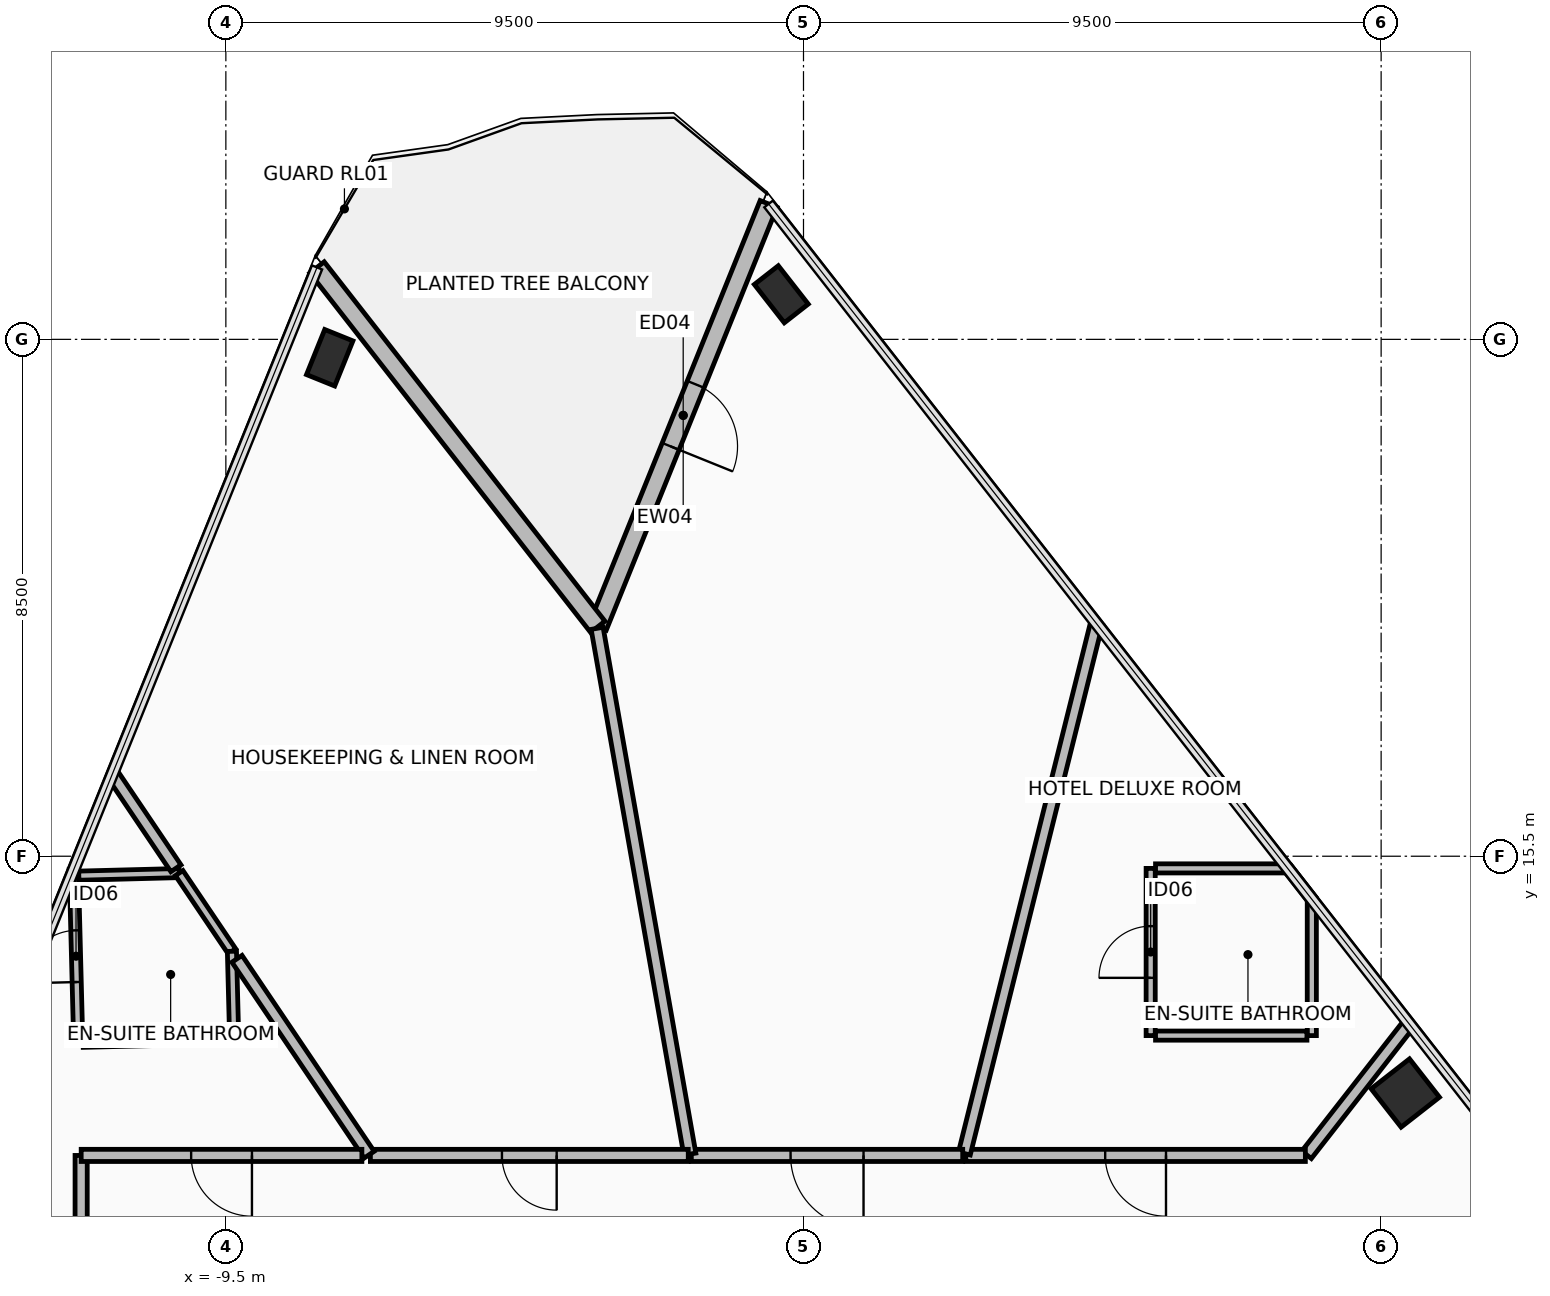
"""IFC4 building model, lengths in metres.
Left out: names, types, materials, properties, quantities, classifications, styles, units other than length and angle.
Written with IfcOpenShell. Run it as: python <this file> out.ifc"""

import sys

from ifc_helpers import new_model, si_unit, direction, frame, frame_2d, origin, origin_2d, place, context, subcontext, project, spatial, rectangle, hollow_rectangle, extrude, element, fill, save


model = new_model("IFC4")
c1 = context("Model", 3, precision=1e-05, world=origin(), true_north=direction((0.0, 1.0)))
c2 = subcontext(c1, "Body", "Model", "MODEL_VIEW")
j1 = project(units=[si_unit("LENGTHUNIT", "METRE"), si_unit("PLANEANGLEUNIT", "RADIAN")], contexts=[c1])
p1 = place(None, origin())
s1 = spatial("IfcSite", under=j1, at=p1, CompositionType="ELEMENT")
p2 = place(p1, origin())
s2 = spatial("IfcBuilding", under=s1, at=p2, CompositionType="ELEMENT")
p3 = place(p2, frame((0.0, 0.0, 70.75)))
s3 = spatial("IfcBuildingStorey", under=s2, at=p3, CompositionType="ELEMENT", Elevation=70.75)
p4 = place(p3, frame((-7.792, 23.698, 0.0), z_axis=(0.0, 0.0, 1.0), x_axis=(0.374608211656, 0.927183200754, 0.0)))
e1 = element("IfcColumn", 1, at=p4, inside=s3, PredefinedType="COLUMN", context=c2, shape_type="SweptSolid", body=[
    extrude(hollow_rectangle(XDim=0.5, YDim=0.8, WallThickness=0.04, at=origin_2d()), origin(), (0.0, 0.0, 1.0), 3.45),
])
p5 = place(p3, frame((9.898, 11.606, 0.0), z_axis=(0.0, 0.0, 1.0), x_axis=(-0.615661475326, 0.788010753607, 0.0)))
e2 = element("IfcColumn", 2, at=p5, inside=s3, PredefinedType="COLUMN", context=c2, shape_type="SweptSolid", body=[
    extrude(hollow_rectangle(XDim=0.8, YDim=0.8, WallThickness=0.045, at=origin_2d()), origin(), (0.0, 0.0, 1.0), 3.45),
])
p6 = place(p3, frame((-0.365, 24.741, 0.0), z_axis=(0.0, 0.0, 1.0), x_axis=(-0.615661475326, 0.788010753607, 0.0)))
e3 = element("IfcColumn", 3, at=p6, inside=s3, PredefinedType="COLUMN", context=c2, shape_type="SweptSolid", body=[
    extrude(hollow_rectangle(XDim=0.5, YDim=0.8, WallThickness=0.04, at=origin_2d()), origin(), (0.0, 0.0, 1.0), 3.45),
])
p7 = place(p3, frame((-0.574, 26.227, 0.0), z_axis=(0.0, 0.0, 1.0), x_axis=(-0.374609979755, -0.92718248639, 0.0)))
e4 = element("IfcWall", 4, at=p7, inside=s3, PredefinedType="STANDARD", context=c2, shape_type="SweptSolid", body=[
    extrude(rectangle(XDim=7.5, YDim=0.3, at=frame_2d((3.75, 0.0))), origin(), (0.0, 0.0, 1.0), 2.47),
])
p8 = place(p7, frame((3.2, 0.0, 0.0)))
e5 = element("IfcOpeningElement", 5, at=p8, cuts=e4, PredefinedType="OPENING", context=c2, shape_type="SweptSolid", body=[
    extrude(rectangle(XDim=1.1, YDim=2.2, at=frame_2d((0.55, 1.1))), frame((0.0, 0.16, 0.0), z_axis=(0.0, -1.0, 0.0), x_axis=(1.0, 0.0, 0.0)), (0.0, 0.0, 1.0), 0.32),
])
p9 = place(p3, frame((-3.383, 19.273, 0.0), z_axis=(0.0, 0.0, 1.0), x_axis=(-0.615654149001, 0.788016477504, 0.0)))
e6 = element("IfcWall", 6, at=p9, inside=s3, PredefinedType="STANDARD", context=c2, shape_type="SweptSolid", body=[
    extrude(rectangle(XDim=7.5, YDim=0.3, at=frame_2d((3.75, 0.0))), origin(), (0.0, 0.0, 1.0), 2.47),
])
p10 = place(p3, frame((5.71, 12.55, 0.0), z_axis=(0.0, 0.0, 1.0), x_axis=(0.0, 1.0, 0.0)))
e7 = element("IfcWall", 7, at=p10, inside=s3, PredefinedType="PARTITIONING", context=c2, shape_type="SweptSolid", body=[
    extrude(rectangle(XDim=2.75, YDim=0.15, at=frame_2d((1.375, 0.0))), origin(), (0.0, 0.0, 1.0), 2.87),
])
p11 = place(p10, frame((0.95, 0.0, 0.0)))
e8 = element("IfcOpeningElement", 8, at=p11, cuts=e7, PredefinedType="OPENING", context=c2, shape_type="SweptSolid", body=[
    extrude(rectangle(XDim=0.85, YDim=2.1, at=frame_2d((0.425, 1.05))), frame((0.0, 0.085, 0.0), z_axis=(0.0, -1.0, 0.0), x_axis=(1.0, 0.0, 0.0)), (0.0, 0.0, 1.0), 0.17),
])
p12 = place(p3, frame((5.79, 15.3, 0.0), z_axis=(0.0, 0.0, 1.0), x_axis=(1.0, 0.0, 0.0)))
e9 = element("IfcWall", 9, at=p12, inside=s3, PredefinedType="PARTITIONING", context=c2, shape_type="SweptSolid", body=[
    extrude(rectangle(XDim=2.174, YDim=0.15, at=frame_2d((1.087, 0.0))), origin(), (0.0, 0.0, 1.0), 2.47),
])
p13 = place(p3, frame((7.963, 15.3, 0.0), z_axis=(0.0, 0.0, 1.0), x_axis=(0.615592549259, -0.788064599698, 0.0)))
e10 = element("IfcWall", 10, at=p13, inside=s3, PredefinedType="PARTITIONING", context=c2, shape_type="SweptSolid", body=[
    extrude(rectangle(XDim=0.644, YDim=0.15, at=frame_2d((0.322, 0.0))), origin(), (0.0, 0.0, 1.0), 3.275),
])
p14 = place(p3, frame((8.36, 14.792, 0.0), z_axis=(0.0, 0.0, 1.0), x_axis=(0.0, -1.0, 0.0)))
e11 = element("IfcWall", 11, at=p14, inside=s3, PredefinedType="PARTITIONING", context=c2, shape_type="SweptSolid", body=[
    extrude(rectangle(XDim=2.242, YDim=0.15, at=frame_2d((1.121, 0.0))), origin(), (0.0, 0.0, 1.0), 2.47),
])
p15 = place(p3, frame((8.28, 12.55, 0.0), z_axis=(0.0, 0.0, 1.0), x_axis=(-1.0, 0.0, 0.0)))
e12 = element("IfcWall", 12, at=p15, inside=s3, PredefinedType="PARTITIONING", context=c2, shape_type="SweptSolid", body=[
    extrude(rectangle(XDim=2.49, YDim=0.15, at=frame_2d((1.245, 0.0))), origin(), (0.0, 0.0, 1.0), 2.87),
])
p16 = place(p3, frame((-11.927, 12.429, 0.0), z_axis=(0.0, 0.0, 1.0), x_axis=(-0.025753181092, 0.99966833183, 0.0)))
e13 = element("IfcWall", 13, at=p16, inside=s3, PredefinedType="PARTITIONING", context=c2, shape_type="SweptSolid", body=[
    extrude(rectangle(XDim=2.854, YDim=0.15, at=frame_2d((1.427, 0.0))), origin(), (0.0, 0.0, 1.0), 2.47),
])
p17 = place(p16, frame((1.002, 0.0, 0.0)))
e14 = element("IfcOpeningElement", 14, at=p17, cuts=e13, PredefinedType="OPENING", context=c2, shape_type="SweptSolid", body=[
    extrude(rectangle(XDim=0.85, YDim=2.1, at=frame_2d((0.425, 1.05))), frame((0.0, 0.085, 0.0), z_axis=(0.0, -1.0, 0.0), x_axis=(1.0, 0.0, 0.0)), (0.0, 0.0, 1.0), 0.17),
])
p18 = place(p3, frame((-11.918, 15.18, 0.0), z_axis=(0.0, 0.0, 1.0), x_axis=(0.999668899852, 0.02573112257, 0.0)))
e15 = element("IfcWall", 15, at=p18, inside=s3, PredefinedType="PARTITIONING", context=c2, shape_type="SweptSolid", body=[
    extrude(rectangle(XDim=1.651, YDim=0.15, at=frame_2d((0.825, 0.0))), origin(), (0.0, 0.0, 1.0), 2.47),
])
p19 = place(p3, frame((-10.268, 15.223, 0.0), z_axis=(0.0, 0.0, 1.0), x_axis=(0.559229675695, -0.82901276819, 0.0)))
e16 = element("IfcWall", 16, at=p19, inside=s3, PredefinedType="PARTITIONING", context=c2, shape_type="SweptSolid", body=[
    extrude(rectangle(XDim=1.552, YDim=0.15, at=frame_2d((0.776, 0.0))), origin(), (0.0, 0.0, 1.0), 3.275),
])
p20 = place(p3, frame((-9.4, 13.936, 0.0), z_axis=(0.0, 0.0, 1.0), x_axis=(0.025745445057, -0.999668531094, 0.0)))
e17 = element("IfcWall", 17, at=p20, inside=s3, PredefinedType="PARTITIONING", context=c2, shape_type="SweptSolid", body=[
    extrude(rectangle(XDim=1.441, YDim=0.15, at=frame_2d((0.721, 0.0))), origin(), (0.0, 0.0, 1.0), 3.275),
])
p21 = place(p3, frame((-9.443, 12.493, 0.0), z_axis=(0.0, 0.0, 1.0), x_axis=(-0.999667618691, -0.025780848324, 0.0)))
e18 = element("IfcWall", 18, at=p21, inside=s3, PredefinedType="PARTITIONING", context=c2, shape_type="SweptSolid", body=[
    extrude(rectangle(XDim=2.405, YDim=0.15, at=frame_2d((1.203, 0.0))), origin(), (0.0, 0.0, 1.0), 3.275),
])
p22 = place(p3, frame((9.947, 12.731, 0.0), z_axis=(0.0, 0.0, 1.0), x_axis=(-0.615680653303, -0.787995769753, 0.0)))
e19 = element("IfcWall", 19, at=p22, inside=s3, PredefinedType="PARTITIONING", context=c2, shape_type="SweptSolid", body=[
    extrude(rectangle(XDim=2.718, YDim=0.2, at=frame_2d((1.359, 0.0))), origin(), (0.0, 0.0, 1.0), 2.47),
])
p23 = place(p3, frame((8.254, 10.58, 0.0), z_axis=(0.0, 0.0, 1.0), x_axis=(-1.0, 0.0, 0.0)))
e20 = element("IfcWall", 20, at=p23, inside=s3, PredefinedType="PARTITIONING", context=c2, shape_type="SweptSolid", body=[
    extrude(rectangle(XDim=5.584, YDim=0.2, at=frame_2d((2.792, 0.0))), origin(), (0.0, 0.0, 1.0), 2.67),
])
p24 = place(p23, frame((2.292, 0.0, 0.0)))
e21 = element("IfcOpeningElement", 21, at=p24, cuts=e20, PredefinedType="OPENING", context=c2, shape_type="SweptSolid", body=[
    extrude(rectangle(XDim=1.0, YDim=2.15, at=frame_2d((0.5, 1.075))), frame((0.0, 0.11, 0.0), z_axis=(0.0, -1.0, 0.0), x_axis=(1.0, 0.0, 0.0)), (0.0, 0.0, 1.0), 0.22),
])
p25 = place(p3, frame((2.646, 10.611, 0.0), z_axis=(0.0, 0.0, 1.0), x_axis=(0.241940721885, 0.970291032162, 0.0)))
e22 = element("IfcWall", 22, at=p25, inside=s3, PredefinedType="PARTITIONING", context=c2, shape_type="SweptSolid", body=[
    extrude(rectangle(XDim=8.981, YDim=0.2, at=frame_2d((4.49, 0.0))), origin(), (0.0, 0.0, 1.0), 2.47),
])
p26 = place(p3, frame((2.618, 10.58, 0.0), z_axis=(0.0, 0.0, 1.0), x_axis=(-1.0, 0.0, 0.0)))
e23 = element("IfcWall", 23, at=p26, inside=s3, PredefinedType="PARTITIONING", context=c2, shape_type="SweptSolid", body=[
    extrude(rectangle(XDim=4.463, YDim=0.2, at=frame_2d((2.231, 0.0))), origin(), (0.0, 0.0, 1.0), 2.67),
])
p27 = place(p26, frame((1.631, 0.0, 0.0)))
e24 = element("IfcOpeningElement", 24, at=p27, cuts=e23, PredefinedType="OPENING", context=c2, shape_type="SweptSolid", body=[
    extrude(rectangle(XDim=1.2, YDim=2.15, at=frame_2d((0.6, 1.075))), frame((0.0, 0.11, 0.0), z_axis=(0.0, -1.0, 0.0), x_axis=(1.0, 0.0, 0.0)), (0.0, 0.0, 1.0), 0.22),
])
p28 = place(p3, frame((-1.869, 10.601, 0.0), z_axis=(0.0, 0.0, 1.0), x_axis=(-0.173639404774, 0.98480929987, 0.0)))
e25 = element("IfcWall", 25, at=p28, inside=s3, PredefinedType="PARTITIONING", context=c2, shape_type="SweptSolid", body=[
    extrude(rectangle(XDim=8.781, YDim=0.2, at=frame_2d((4.39, 0.0))), origin(), (0.0, 0.0, 1.0), 3.275),
])
p29 = place(p3, frame((-1.895, 10.58, 0.0), z_axis=(0.0, 0.0, 1.0), x_axis=(-1.0, 0.0, 0.0)))
e26 = element("IfcWall", 26, at=p29, inside=s3, PredefinedType="PARTITIONING", context=c2, shape_type="SweptSolid", body=[
    extrude(rectangle(XDim=5.228, YDim=0.2, at=frame_2d((2.614, 0.0))), origin(), (0.0, 0.0, 1.0), 3.275),
])
p30 = place(p29, frame((2.164, 0.0, 0.0)))
e27 = element("IfcOpeningElement", 27, at=p30, cuts=e26, PredefinedType="OPENING", context=c2, shape_type="SweptSolid", body=[
    extrude(rectangle(XDim=0.9, YDim=2.1, at=frame_2d((0.45, 1.05))), frame((0.0, 0.11, 0.0), z_axis=(0.0, -1.0, 0.0), x_axis=(1.0, 0.0, 0.0)), (0.0, 0.0, 1.0), 0.22),
])
p31 = place(p3, frame((-7.144, 10.591, 0.0), z_axis=(0.0, 0.0, 1.0), x_axis=(-0.559171794076, 0.829051810631, 0.0)))
e28 = element("IfcWall", 28, at=p31, inside=s3, PredefinedType="PARTITIONING", context=c2, shape_type="SweptSolid", body=[
    extrude(rectangle(XDim=3.886, YDim=0.2, at=frame_2d((1.943, 0.0))), origin(), (0.0, 0.0, 1.0), 2.62),
])
p32 = place(p3, frame((-10.321, 15.302, 0.0), z_axis=(0.0, 0.0, 1.0), x_axis=(-0.559274091042, 0.828982805062, 0.0)))
e29 = element("IfcWall", 29, at=p32, inside=s3, PredefinedType="PARTITIONING", context=c2, shape_type="SweptSolid", body=[
    extrude(rectangle(XDim=1.857, YDim=0.2, at=frame_2d((0.928, 0.0))), origin(), (0.0, 0.0, 1.0), 2.47),
])
p33 = place(p3, frame((-11.88, 10.579, 0.0), z_axis=(0.0, 0.0, 1.0), x_axis=(0.0, -1.0, 0.0)))
e30 = element("IfcWall", 30, at=p33, inside=s3, PredefinedType="PARTITIONING", context=c2, shape_type="SweptSolid", body=[
    extrude(rectangle(XDim=3.111, YDim=0.2, at=frame_2d((1.555, 0.0))), origin(), (0.0, 0.0, 1.0), 2.67),
])
p34 = place(p3, frame((-7.263, 10.58, 0.0), z_axis=(0.0, 0.0, 1.0), x_axis=(-1.0, 0.0, 0.0)))
e31 = element("IfcWall", 31, at=p34, inside=s3, PredefinedType="PARTITIONING", context=c2, shape_type="SweptSolid", body=[
    extrude(rectangle(XDim=4.616, YDim=0.2, at=frame_2d((2.308, 0.0))), origin(), (0.0, 0.0, 1.0), 2.62),
])
p35 = place(p34, frame((1.808, 0.0, 0.0)))
e32 = element("IfcOpeningElement", 32, at=p35, cuts=e31, PredefinedType="OPENING", context=c2, shape_type="SweptSolid", body=[
    extrude(rectangle(XDim=1.0, YDim=2.15, at=frame_2d((0.5, 1.075))), frame((0.0, 0.11, 0.0), z_axis=(0.0, -1.0, 0.0), x_axis=(1.0, 0.0, 0.0)), (0.0, 0.0, 1.0), 0.22),
])
p36 = place(p8, frame((1.1, 0.0, 0.0), z_axis=(0.0, 0.0, 1.0), x_axis=(-1.0, 0.0, 0.0)))
e33 = element("IfcDoor", 33, at=p36, inside=s3, OperationType="SINGLE_SWING_LEFT", PredefinedType="DOOR", context=c2, shape_type="SweptSolid", body=[
    extrude(rectangle(XDim=1.1, YDim=2.2, at=frame_2d((0.55, 1.1))), frame((0.0, 0.025, 0.0), z_axis=(0.0, -1.0, 0.0), x_axis=(1.0, 0.0, 0.0)), (0.0, 0.0, 1.0), 0.05),
])
fill(e5, e33)
p37 = place(p11, origin())
e34 = element("IfcDoor", 34, at=p37, inside=s3, OperationType="SINGLE_SWING_RIGHT", PredefinedType="DOOR", context=c2, shape_type="SweptSolid", body=[
    extrude(rectangle(XDim=0.85, YDim=2.1, at=frame_2d((0.425, 1.05))), frame((0.0, 0.025, 0.0), z_axis=(0.0, -1.0, 0.0), x_axis=(1.0, 0.0, 0.0)), (0.0, 0.0, 1.0), 0.05),
])
fill(e8, e34)
p38 = place(p17, origin())
e35 = element("IfcDoor", 35, at=p38, inside=s3, OperationType="SINGLE_SWING_RIGHT", PredefinedType="DOOR", context=c2, shape_type="SweptSolid", body=[
    extrude(rectangle(XDim=0.85, YDim=2.1, at=frame_2d((0.425, 1.05))), frame((0.0, 0.025, 0.0), z_axis=(0.0, -1.0, 0.0), x_axis=(1.0, 0.0, 0.0)), (0.0, 0.0, 1.0), 0.05),
])
fill(e14, e35)
p39 = place(p24, origin())
e36 = element("IfcDoor", 36, at=p39, inside=s3, OperationType="SINGLE_SWING_LEFT", PredefinedType="DOOR", context=c2, shape_type="SweptSolid", body=[
    extrude(rectangle(XDim=1.0, YDim=2.15, at=frame_2d((0.5, 1.075))), frame((0.0, 0.025, 0.0), z_axis=(0.0, -1.0, 0.0), x_axis=(1.0, 0.0, 0.0)), (0.0, 0.0, 1.0), 0.05),
])
fill(e21, e36)
p40 = place(p27, origin())
e37 = element("IfcDoor", 37, at=p40, inside=s3, OperationType="SINGLE_SWING_LEFT", PredefinedType="DOOR", context=c2, shape_type="SweptSolid", body=[
    extrude(rectangle(XDim=1.2, YDim=2.15, at=frame_2d((0.6, 1.075))), frame((0.0, 0.025, 0.0), z_axis=(0.0, -1.0, 0.0), x_axis=(1.0, 0.0, 0.0)), (0.0, 0.0, 1.0), 0.05),
])
fill(e24, e37)
p41 = place(p30, origin())
e38 = element("IfcDoor", 38, at=p41, inside=s3, OperationType="SINGLE_SWING_LEFT", PredefinedType="DOOR", context=c2, shape_type="SweptSolid", body=[
    extrude(rectangle(XDim=0.9, YDim=2.1, at=frame_2d((0.45, 1.05))), frame((0.0, 0.025, 0.0), z_axis=(0.0, -1.0, 0.0), x_axis=(1.0, 0.0, 0.0)), (0.0, 0.0, 1.0), 0.05),
])
fill(e27, e38)
p42 = place(p35, origin())
e39 = element("IfcDoor", 39, at=p42, inside=s3, OperationType="SINGLE_SWING_LEFT", PredefinedType="DOOR", context=c2, shape_type="SweptSolid", body=[
    extrude(rectangle(XDim=1.0, YDim=2.15, at=frame_2d((0.5, 1.075))), frame((0.0, 0.025, 0.0), z_axis=(0.0, -1.0, 0.0), x_axis=(1.0, 0.0, 0.0)), (0.0, 0.0, 1.0), 0.05),
])
fill(e32, e39)
save(model, sys.argv[1])
